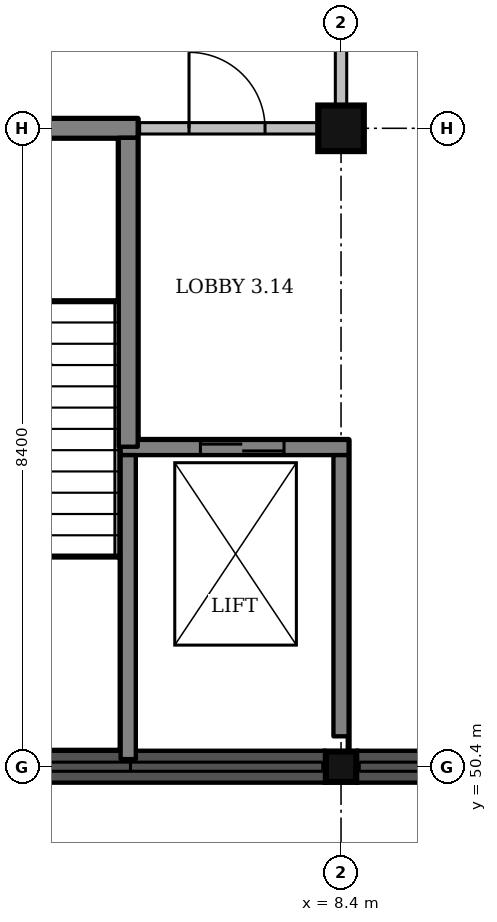
"""IFC4 building model, lengths in metres.
Left out: names, types, materials, properties, quantities, classifications, styles, units other than length and angle.
Written with IfcOpenShell. Run it as: python <this file> out.ifc"""

import sys

from ifc_helpers import new_model, si_unit, direction, frame, frame_2d, origin, origin_2d, place, context, subcontext, project, spatial, rectangle, extrude, element, fill, save


model = new_model("IFC4")
c1 = context("Model", 3, precision=1e-05, world=origin(), true_north=direction((0.0, 1.0)))
c2 = subcontext(c1, "Body", "Model", "MODEL_VIEW")
j1 = project(units=[si_unit("LENGTHUNIT", "METRE"), si_unit("PLANEANGLEUNIT", "RADIAN")], contexts=[c1])
p1 = place(None, origin())
s1 = spatial("IfcSite", under=j1, at=p1, CompositionType="ELEMENT")
p2 = place(p1, origin())
s2 = spatial("IfcBuilding", under=s1, at=p2, CompositionType="ELEMENT")
p3 = place(p2, frame((0.0, 0.0, 13.5)))
s3 = spatial("IfcBuildingStorey", under=s2, at=p3, CompositionType="ELEMENT", Elevation=13.5)
p4 = place(p3, frame((8.4, 50.4, 0.0), z_axis=(0.0, 0.0, 1.0), x_axis=(1.0, 0.0, 0.0)))
e1 = element("IfcColumn", 1, at=p4, inside=s3, PredefinedType="COLUMN", context=c2, shape_type="SweptSolid", body=[
    extrude(rectangle(XDim=0.4, YDim=0.4, at=origin_2d()), origin(), (0.0, 0.0, 1.0), 4.5),
])
p5 = place(p3, frame((8.4, 58.8, 0.0), z_axis=(0.0, 0.0, 1.0), x_axis=(1.0, 0.0, 0.0)))
e2 = element("IfcColumn", 2, at=p5, inside=s3, PredefinedType="COLUMN", context=c2, shape_type="SweptSolid", body=[
    extrude(rectangle(XDim=0.6, YDim=0.6, at=origin_2d()), origin(), (0.0, 0.0, 1.0), 4.5),
])
p6 = place(p3, frame((5.5, 54.6, 0.0), z_axis=(0.0, 0.0, 1.0), x_axis=(1.0, 0.0, 0.0)))
e3 = element("IfcWall", 3, at=p6, inside=s3, PredefinedType="SHEAR", context=c2, shape_type="SweptSolid", body=[
    extrude(rectangle(XDim=3.0, YDim=0.2, at=frame_2d((1.5, 0.0))), origin(), (0.0, 0.0, 1.0), 4.5),
])
p7 = place(p6, frame((1.05, 0.0, 0.0)))
e4 = element("IfcOpeningElement", 4, at=p7, cuts=e3, PredefinedType="OPENING", context=c2, shape_type="SweptSolid", body=[
    extrude(rectangle(XDim=1.1, YDim=2.1, at=frame_2d((0.55, 1.05))), frame((0.0, 0.11, 0.0), z_axis=(0.0, -1.0, 0.0), x_axis=(1.0, 0.0, 0.0)), (0.0, 0.0, 1.0), 0.22),
])
p8 = place(p3, frame((5.6, 50.5, 0.0), z_axis=(0.0, 0.0, 1.0), x_axis=(0.0, 1.0, 0.0)))
e5 = element("IfcWall", 5, at=p8, inside=s3, PredefinedType="SHEAR", context=c2, shape_type="SweptSolid", body=[
    extrude(rectangle(XDim=4.0, YDim=0.2, at=frame_2d((2.0, 0.0))), origin(), (0.0, 0.0, 1.0), 4.5),
])
p9 = place(p3, frame((8.4, 50.8, 0.0), z_axis=(0.0, 0.0, 1.0), x_axis=(0.0, 1.0, 0.0)))
e6 = element("IfcWall", 6, at=p9, inside=s3, PredefinedType="SHEAR", context=c2, shape_type="SweptSolid", body=[
    extrude(rectangle(XDim=3.7, YDim=0.2, at=frame_2d((1.85, 0.0))), origin(), (0.0, 0.0, 1.0), 4.5),
])
p10 = place(p3, frame((0.225, 58.8, 0.0), z_axis=(0.0, 0.0, 1.0), x_axis=(1.0, 0.0, 0.0)))
e7 = element("IfcWall", 7, at=p10, inside=s3, PredefinedType="SHEAR", context=c2, shape_type="SweptSolid", body=[
    extrude(rectangle(XDim=5.5, YDim=0.25, at=frame_2d((2.75, 0.0))), origin(), (0.0, 0.0, 1.0), 4.5),
])
p11 = place(p10, frame((2.05, 0.0, 0.0)))
e8 = element("IfcOpeningElement", 8, at=p11, cuts=e7, PredefinedType="OPENING", context=c2, shape_type="SweptSolid", body=[
    extrude(rectangle(XDim=1.0, YDim=2.1, at=frame_2d((0.5, 1.05))), frame((0.0, 0.135, 0.0), z_axis=(0.0, -1.0, 0.0), x_axis=(1.0, 0.0, 0.0)), (0.0, 0.0, 1.0), 0.27),
])
p12 = place(p3, frame((5.6, 54.61, 0.0), z_axis=(0.0, 0.0, 1.0), x_axis=(0.0, 1.0, 0.0)))
e9 = element("IfcWall", 9, at=p12, inside=s3, PredefinedType="SHEAR", context=c2, shape_type="SweptSolid", body=[
    extrude(rectangle(XDim=4.065, YDim=0.25, at=frame_2d((2.032, 0.0))), origin(), (0.0, 0.0, 1.0), 4.5),
])
p13 = place(p3, frame((4.525, 50.4, 0.0), z_axis=(0.0, 0.0, 1.0), x_axis=(1.0, 0.0, 0.0)))
e10 = element("IfcWall", 10, at=p13, inside=s3, PredefinedType="SOLIDWALL", context=c2, shape_type="SweptSolid", body=[
    extrude(rectangle(XDim=3.675, YDim=0.42, at=frame_2d((1.837, 0.0))), origin(), (0.0, 0.0, 1.0), 3.65),
])
p14 = place(p3, frame((8.6, 50.4, 0.0), z_axis=(0.0, 0.0, 1.0), x_axis=(1.0, 0.0, 0.0)))
e11 = element("IfcWall", 11, at=p14, inside=s3, PredefinedType="SOLIDWALL", context=c2, shape_type="SweptSolid", body=[
    extrude(rectangle(XDim=3.7, YDim=0.42, at=frame_2d((1.85, 0.0))), origin(), (0.0, 0.0, 1.0), 4.2),
])
p15 = place(p3, frame((5.75, 58.8, 0.0), z_axis=(0.0, 0.0, 1.0), x_axis=(1.0, 0.0, 0.0)))
e12 = element("IfcWall", 12, at=p15, inside=s3, PredefinedType="PARTITIONING", context=c2, shape_type="SweptSolid", body=[
    extrude(rectangle(XDim=2.35, YDim=0.15, at=frame_2d((1.175, 0.0))), origin(), (0.0, 0.0, 1.0), 3.5),
])
p16 = place(p15, frame((0.65, 0.0, 0.0)))
e13 = element("IfcOpeningElement", 13, at=p16, cuts=e12, PredefinedType="OPENING", context=c2, shape_type="SweptSolid", body=[
    extrude(rectangle(XDim=1.0, YDim=2.1, at=frame_2d((0.5, 1.05))), frame((0.0, 0.085, 0.0), z_axis=(0.0, -1.0, 0.0), x_axis=(1.0, 0.0, 0.0)), (0.0, 0.0, 1.0), 0.17),
])
p17 = place(p3, frame((8.4, 59.1, 0.0), z_axis=(0.0, 0.0, 1.0), x_axis=(0.0, 1.0, 0.0)))
e14 = element("IfcWall", 14, at=p17, inside=s3, PredefinedType="PARTITIONING", context=c2, shape_type="SweptSolid", body=[
    extrude(rectangle(XDim=7.8, YDim=0.15, at=frame_2d((3.9, 0.0))), origin(), (0.0, 0.0, 1.0), 3.4),
])
p18 = place(p16, origin())
e15 = element("IfcDoor", 15, at=p18, inside=s3, OperationType="SINGLE_SWING_LEFT", PredefinedType="DOOR", context=c2, shape_type="SweptSolid", body=[
    extrude(rectangle(XDim=1.0, YDim=2.1, at=frame_2d((0.5, 1.05))), frame((0.0, 0.025, 0.0), z_axis=(0.0, -1.0, 0.0), x_axis=(1.0, 0.0, 0.0)), (0.0, 0.0, 1.0), 0.05),
])
fill(e13, e15)
p19 = place(p7, origin())
e16 = element("IfcDoor", 16, at=p19, inside=s3, OperationType="SLIDING_TO_RIGHT", PredefinedType="DOOR", context=c2, shape_type="SweptSolid", body=[
    extrude(rectangle(XDim=1.1, YDim=2.1, at=frame_2d((0.55, 1.05))), frame((0.0, 0.025, 0.0), z_axis=(0.0, -1.0, 0.0), x_axis=(1.0, 0.0, 0.0)), (0.0, 0.0, 1.0), 0.05),
])
fill(e4, e16)
save(model, sys.argv[1])
